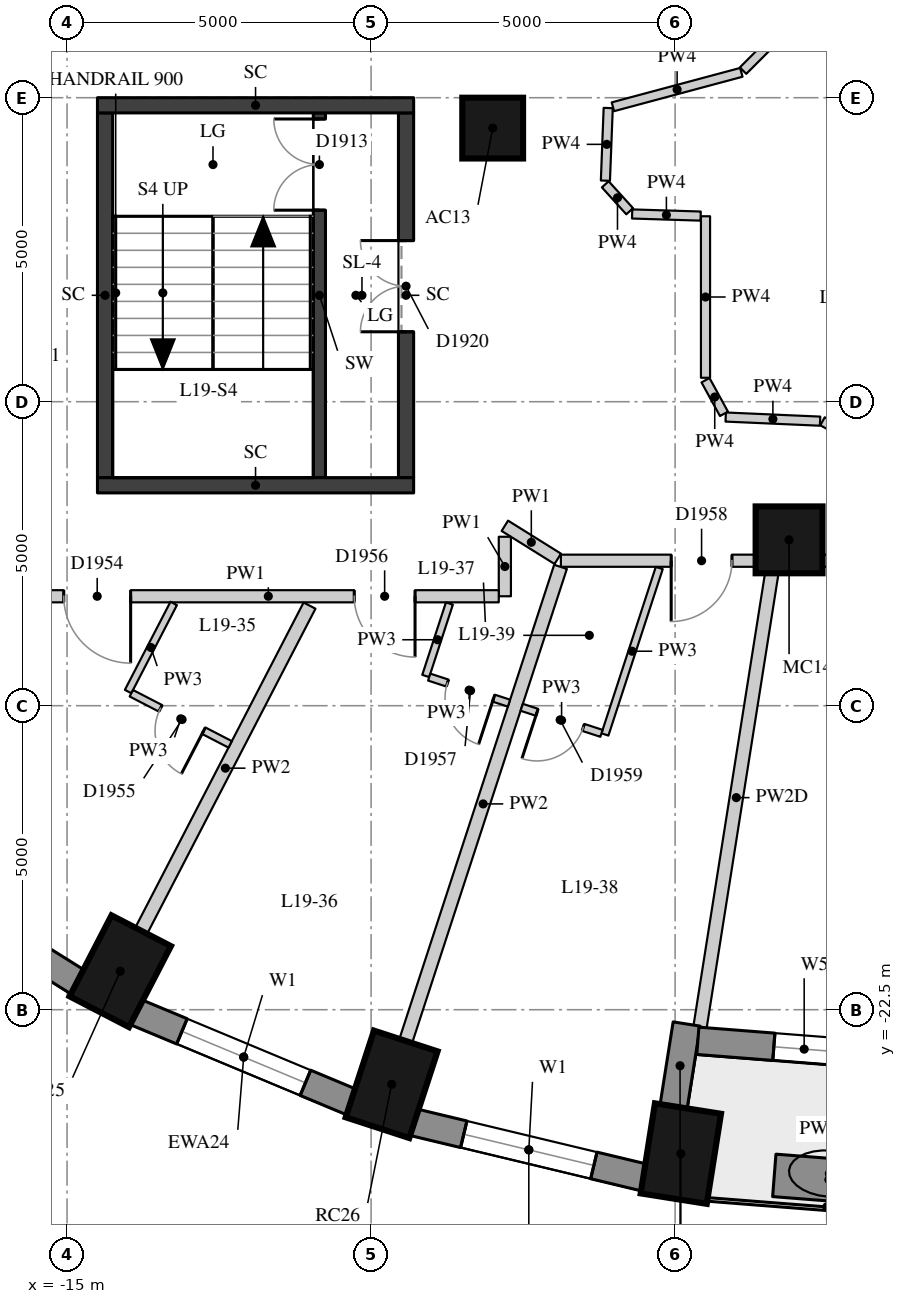
"""IFC4 building model, lengths in metres.
Left out: names, types, materials, properties, quantities, classifications, styles, units other than length and angle.
Written with IfcOpenShell. Run it as: python <this file> out.ifc"""

import sys

from ifc_helpers import new_model, si_unit, direction, frame, frame_2d, origin, origin_2d, place, context, subcontext, project, spatial, rectangle, extrude, element, fill, save


model = new_model("IFC4")
c1 = context("Model", 3, precision=1e-05, world=origin(), true_north=direction((0.0, 1.0)))
c2 = subcontext(c1, "Body", "Model", "MODEL_VIEW")
j1 = project(units=[si_unit("LENGTHUNIT", "METRE"), si_unit("PLANEANGLEUNIT", "RADIAN")], contexts=[c1])
p1 = place(None, origin())
s1 = spatial("IfcSite", under=j1, at=p1, CompositionType="ELEMENT")
p2 = place(p1, origin())
s2 = spatial("IfcBuilding", under=s1, at=p2, CompositionType="ELEMENT")
p3 = place(p2, frame((0.0, 0.0, 71.2)))
s3 = spatial("IfcBuildingStorey", under=s2, at=p3, CompositionType="ELEMENT", Elevation=71.2)
for number, where, z_axis, x_axis in (
    (1, (-14.125, -21.867, 0.0), (0.0, 0.0, 1.0), (-0.46, -0.888, 0.0)),
    (2, (-9.662, -23.727, 0.0), (0.0, 0.0, 1.0), (-0.31, -0.951, 0.0)),
    (3, (-4.906, -24.866, 0.0), (0.0, 0.0, 1.0), (-0.156, -0.988, 0.0)),
):
    element("IfcColumn", number, at=place(p3, frame(where, z_axis=z_axis, x_axis=x_axis)), inside=s3, PredefinedType="COLUMN", context=c2, shape_type="SweptSolid", body=[
        extrude(rectangle(XDim=1.5, YDim=1.1, at=origin_2d()), origin(), (0.0, 0.0, 1.0), 3.3),
    ])
p4 = place(p3, frame((-8.0, -8.0, 0.0), z_axis=(0.0, 0.0, 1.0), x_axis=(1.0, 0.0, 0.0)))
e4 = element("IfcColumn", 4, at=p4, inside=s3, PredefinedType="COLUMN", context=c2, shape_type="SweptSolid", body=[
    extrude(rectangle(XDim=1.0, YDim=1.0, at=origin_2d()), origin(), (0.0, 0.0, 1.0), 3.3),
])
p5 = place(p3, frame((-3.126, -14.772, 0.0), z_axis=(0.0, 0.0, 1.0), x_axis=(1.0, 0.0, 0.0)))
e5 = element("IfcColumn", 5, at=p5, inside=s3, PredefinedType="COLUMN", context=c2, shape_type="SweptSolid", body=[
    extrude(rectangle(XDim=1.1, YDim=1.1, at=origin_2d()), origin(), (0.0, 0.0, 1.0), 3.3),
])
p6 = place(p3, frame((-18.023, -20.044, 0.0), z_axis=(0.0, 0.0, 1.0), x_axis=(0.847635480093, -0.530579016629, 0.0)))
e6 = element("IfcWall", 6, at=p6, inside=s3, PredefinedType="SOLIDWALL", context=c2, shape_type="SweptSolid", body=[
    extrude(rectangle(XDim=3.782, YDim=0.45, at=frame_2d((1.891, 0.0))), origin(), (0.0, 0.0, 1.0), 3.02),
])
p7 = place(p6, frame((0.791, 0.0, 0.4)))
e7 = element("IfcOpeningElement", 7, at=p7, cuts=e6, PredefinedType="OPENING", context=c2, shape_type="SweptSolid", body=[
    extrude(rectangle(XDim=2.2, YDim=1.75, at=frame_2d((1.1, 0.875))), frame((0.0, 0.235, 0.0), z_axis=(0.0, -1.0, 0.0), x_axis=(1.0, 0.0, 0.0)), (0.0, 0.0, 1.0), 0.47),
])
p8 = place(p3, frame((-13.875, -22.537, 0.0), z_axis=(0.0, 0.0, 1.0), x_axis=(0.923031964282, -0.384723267966, 0.0)))
e8 = element("IfcWall", 8, at=p8, inside=s3, PredefinedType="SOLIDWALL", context=c2, shape_type="SweptSolid", body=[
    extrude(rectangle(XDim=3.856, YDim=0.45, at=frame_2d((1.928, 0.0))), origin(), (0.0, 0.0, 1.0), 3.02),
])
p9 = place(p8, frame((0.828, 0.0, 0.4)))
e9 = element("IfcOpeningElement", 9, at=p9, cuts=e8, PredefinedType="OPENING", context=c2, shape_type="SweptSolid", body=[
    extrude(rectangle(XDim=2.2, YDim=1.75, at=frame_2d((1.1, 0.875))), frame((0.0, 0.235, 0.0), z_axis=(0.0, -1.0, 0.0), x_axis=(1.0, 0.0, 0.0)), (0.0, 0.0, 1.0), 0.47),
])
p10 = place(p3, frame((-9.308, -24.35, 0.0), z_axis=(0.0, 0.0, 1.0), x_axis=(0.972496561493, -0.232917233979, 0.0)))
e10 = element("IfcWall", 10, at=p10, inside=s3, PredefinedType="SOLIDWALL", context=c2, shape_type="SweptSolid", body=[
    extrude(rectangle(XDim=3.911, YDim=0.45, at=frame_2d((1.956, 0.0))), origin(), (0.0, 0.0, 1.0), 3.02),
])
p11 = place(p10, frame((0.855, 0.0, 0.4)))
e11 = element("IfcOpeningElement", 11, at=p11, cuts=e10, PredefinedType="OPENING", context=c2, shape_type="SweptSolid", body=[
    extrude(rectangle(XDim=2.2, YDim=1.75, at=frame_2d((1.1, 0.875))), frame((0.0, 0.235, 0.0), z_axis=(0.0, -1.0, 0.0), x_axis=(1.0, 0.0, 0.0)), (0.0, 0.0, 1.0), 0.47),
])
p12 = place(p3, frame((-5.027, -24.108, 0.0), z_axis=(0.0, 0.0, 1.0), x_axis=(0.156133927791, 0.98773589415, 0.0)))
e12 = element("IfcWall", 12, at=p12, inside=s3, PredefinedType="SOLIDWALL", context=c2, shape_type="SweptSolid", body=[
    extrude(rectangle(XDim=1.39, YDim=0.45, at=frame_2d((0.695, 0.0))), origin(), (0.0, 0.0, 1.0), 2.47),
])
p13 = place(p3, frame((-4.626, -23.011, 0.0), z_axis=(0.0, 0.0, 1.0), x_axis=(0.996937095772, -0.078207589615, 0.0)))
e13 = element("IfcWall", 13, at=p13, inside=s3, PredefinedType="SOLIDWALL", context=c2, shape_type="SweptSolid", body=[
    extrude(rectangle(XDim=4.657, YDim=0.45, at=frame_2d((2.329, 0.0))), origin(), (0.0, 0.0, 1.0), 3.02),
])
p14 = place(p13, frame((1.254, 0.0, 0.4)))
e14 = element("IfcOpeningElement", 14, at=p14, cuts=e13, PredefinedType="OPENING", context=c2, shape_type="SweptSolid", body=[
    extrude(rectangle(XDim=1.0, YDim=1.75, at=frame_2d((0.5, 0.875))), frame((0.0, 0.235, 0.0), z_axis=(0.0, -1.0, 0.0), x_axis=(1.0, 0.0, 0.0)), (0.0, 0.0, 1.0), 0.47),
])
p15 = place(p13, frame((2.404, 0.0, 0.0)))
e15 = element("IfcOpeningElement", 15, at=p15, cuts=e13, PredefinedType="OPENING", context=c2, shape_type="SweptSolid", body=[
    extrude(rectangle(XDim=1.0, YDim=2.15, at=frame_2d((0.5, 1.075))), frame((0.0, 0.235, 0.0), z_axis=(0.0, -1.0, 0.0), x_axis=(1.0, 0.0, 0.0)), (0.0, 0.0, 1.0), 0.47),
])
p16 = place(p3, frame((-3.369, -25.225, 0.0), z_axis=(0.0, 0.0, 1.0), x_axis=(0.996965267018, -0.077847648384, 0.0)))
e16 = element("IfcWall", 16, at=p16, inside=s3, PredefinedType="USERDEFINED", context=c2, shape_type="SweptSolid", body=[
    extrude(rectangle(XDim=1.8, YDim=0.7, at=frame_2d((0.9, 0.0))), origin(), (0.0, 0.0, 1.0), 0.75),
])
p17 = place(p3, frame((-10.85, -13.75, 0.0), z_axis=(0.0, 0.0, 1.0), x_axis=(0.0, 1.0, 0.0)))
e17 = element("IfcWall", 17, at=p17, inside=s3, PredefinedType="SHEAR", context=c2, shape_type="SweptSolid", body=[
    extrude(rectangle(XDim=6.0, YDim=0.2, at=frame_2d((3.0, 0.0))), origin(), (0.0, 0.0, 1.0), 3.02),
])
p18 = place(p17, frame((4.4, 0.0, 0.0)))
e18 = element("IfcOpeningElement", 18, at=p18, cuts=e17, PredefinedType="OPENING", context=c2, shape_type="SweptSolid", body=[
    extrude(rectangle(XDim=1.5, YDim=2.1, at=frame_2d((0.75, 1.05))), frame((0.0, 0.11, 0.0), z_axis=(0.0, -1.0, 0.0), x_axis=(1.0, 0.0, 0.0)), (0.0, 0.0, 1.0), 0.22),
])
p19 = place(p3, frame((-14.375, -13.75, -0.28), z_axis=(0.0, 0.0, 1.0), x_axis=(0.0, 1.0, 0.0)))
e19 = element("IfcWall", 19, at=p19, inside=s3, PredefinedType="SHEAR", context=c2, shape_type="SweptSolid", body=[
    extrude(rectangle(XDim=6.0, YDim=0.25, at=frame_2d((3.0, 0.0))), origin(), (0.0, 0.0, 1.0), 3.3),
])
p20 = place(p3, frame((-9.425, -13.75, -0.28), z_axis=(0.0, 0.0, 1.0), x_axis=(0.0, 1.0, 0.0)))
e20 = element("IfcWall", 20, at=p20, inside=s3, PredefinedType="SHEAR", context=c2, shape_type="SweptSolid", body=[
    extrude(rectangle(XDim=6.0, YDim=0.25, at=frame_2d((3.0, 0.0))), origin(), (0.0, 0.0, 1.0), 3.3),
])
p21 = place(p20, frame((2.4, 0.0, 0.28)))
e21 = element("IfcOpeningElement", 21, at=p21, cuts=e20, PredefinedType="OPENING", context=c2, shape_type="SweptSolid", body=[
    extrude(rectangle(XDim=1.5, YDim=2.1, at=frame_2d((0.75, 1.05))), frame((0.0, 0.135, 0.0), z_axis=(0.0, -1.0, 0.0), x_axis=(1.0, 0.0, 0.0)), (0.0, 0.0, 1.0), 0.27),
])
for number, where, z_axis, x_axis in (
    (22, (-14.5, -7.625, -0.28), (0.0, 0.0, 1.0), (1.0, 0.0, 0.0)),
    (23, (-14.5, -13.875, -0.28), (0.0, 0.0, 1.0), (1.0, 0.0, 0.0)),
):
    element("IfcWall", number, at=place(p3, frame(where, z_axis=z_axis, x_axis=x_axis)), inside=s3, PredefinedType="SHEAR", context=c2, shape_type="SweptSolid", body=[
        extrude(rectangle(XDim=5.2, YDim=0.25, at=frame_2d((2.6, 0.0))), origin(), (0.0, 0.0, 1.0), 3.3),
    ])
p22 = place(p3, frame((6.778, -15.115, 0.0), z_axis=(0.0, 0.0, 1.0), x_axis=(-1.0, 0.0, 0.0)))
e24 = element("IfcWall", 24, at=p22, inside=s3, PredefinedType="PARTITIONING", context=c2, shape_type="SweptSolid", body=[
    extrude(rectangle(XDim=13.657, YDim=0.2, at=frame_2d((6.828, 0.0))), origin(), (0.0, 0.0, 1.0), 2.42),
])
p23 = place(p22, frame((10.843, 0.0, 0.0)))
e25 = element("IfcOpeningElement", 25, at=p23, cuts=e24, PredefinedType="OPENING", context=c2, shape_type="SweptSolid", body=[
    extrude(rectangle(XDim=1.0, YDim=2.1, at=frame_2d((0.5, 1.05))), frame((0.0, 0.11, 0.0), z_axis=(0.0, -1.0, 0.0), x_axis=(1.0, 0.0, 0.0)), (0.0, 0.0, 1.0), 0.22),
])
p24 = place(p22, frame((4.505, 0.0, 0.0)))
e26 = element("IfcOpeningElement", 26, at=p24, cuts=e24, PredefinedType="OPENING", context=c2, shape_type="SweptSolid", body=[
    extrude(rectangle(XDim=1.1, YDim=2.1, at=frame_2d((0.55, 1.05))), frame((0.0, 0.11, 0.0), z_axis=(0.0, -1.0, 0.0), x_axis=(1.0, 0.0, 0.0)), (0.0, 0.0, 1.0), 0.22),
])
p25 = place(p3, frame((-6.93, -15.084, 0.0), z_axis=(0.0, 0.0, 1.0), x_axis=(-0.848439230109, 0.529292804421, 0.0)))
e27 = element("IfcWall", 27, at=p25, inside=s3, PredefinedType="PARTITIONING", context=c2, shape_type="SweptSolid", body=[
    extrude(rectangle(XDim=1.026, YDim=0.2, at=frame_2d((0.513, 0.0))), origin(), (0.0, 0.0, 1.0), 3.02),
])
p26 = place(p3, frame((-7.8, -14.721, 0.0), z_axis=(0.0, 0.0, 1.0), x_axis=(0.0, -1.0, 0.0)))
e28 = element("IfcWall", 28, at=p26, inside=s3, PredefinedType="PARTITIONING", context=c2, shape_type="SweptSolid", body=[
    extrude(rectangle(XDim=0.979, YDim=0.2, at=frame_2d((0.489, 0.0))), origin(), (0.0, 0.0, 1.0), 3.02),
])
p27 = place(p3, frame((-7.9, -15.7, 0.0), z_axis=(0.0, 0.0, 1.0), x_axis=(-1.0, 0.0, 0.0)))
e29 = element("IfcWall", 29, at=p27, inside=s3, PredefinedType="PARTITIONING", context=c2, shape_type="SweptSolid", body=[
    extrude(rectangle(XDim=7.58, YDim=0.2, at=frame_2d((3.79, 0.0))), origin(), (0.0, 0.0, 1.0), 3.02),
])
p28 = place(p27, frame((6.054, 0.0, 0.0)))
e30 = element("IfcOpeningElement", 30, at=p28, cuts=e29, PredefinedType="OPENING", context=c2, shape_type="SweptSolid", body=[
    extrude(rectangle(XDim=1.1, YDim=2.1, at=frame_2d((0.55, 1.05))), frame((0.0, 0.11, 0.0), z_axis=(0.0, -1.0, 0.0), x_axis=(1.0, 0.0, 0.0)), (0.0, 0.0, 1.0), 0.22),
])
p29 = place(p27, frame((1.377, 0.0, 0.0)))
e31 = element("IfcOpeningElement", 31, at=p29, cuts=e29, PredefinedType="OPENING", context=c2, shape_type="SweptSolid", body=[
    extrude(rectangle(XDim=1.0, YDim=2.1, at=frame_2d((0.5, 1.05))), frame((0.0, 0.11, 0.0), z_axis=(0.0, -1.0, 0.0), x_axis=(1.0, 0.0, 0.0)), (0.0, 0.0, 1.0), 0.22),
])
p30 = place(p3, frame((-1.545, -13.396, 0.0), z_axis=(0.0, 0.0, 1.0), x_axis=(-0.873678559566, 0.486503622345, 0.0)))
e32 = element("IfcWall", 32, at=p30, inside=s3, PredefinedType="PARTITIONING", context=c2, shape_type="SweptSolid", body=[
    extrude(rectangle(XDim=1.18, YDim=0.15, at=frame_2d((0.59, 0.0))), origin(), (0.0, 0.0, 1.0), 3.02),
])
p31 = place(p3, frame((-2.616, -12.82, 0.0), z_axis=(0.0, 0.0, 1.0), x_axis=(-0.99904515517, 0.04368956318, 0.0)))
e33 = element("IfcWall", 33, at=p31, inside=s3, PredefinedType="PARTITIONING", context=c2, shape_type="SweptSolid", body=[
    extrude(rectangle(XDim=1.553, YDim=0.15, at=frame_2d((0.777, 0.0))), origin(), (0.0, 0.0, 1.0), 3.02),
])
p32 = place(p3, frame((-4.196, -12.699, 0.0), z_axis=(0.0, 0.0, 1.0), x_axis=(-0.481398734925, 0.876501715921, 0.0)))
e34 = element("IfcWall", 34, at=p32, inside=s3, PredefinedType="PARTITIONING", context=c2, shape_type="SweptSolid", body=[
    extrude(rectangle(XDim=0.631, YDim=0.15, at=frame_2d((0.315, 0.0))), origin(), (0.0, 0.0, 1.0), 3.02),
])
p33 = place(p3, frame((-4.5, -12.106, 0.0), z_axis=(0.0, 0.0, 1.0), x_axis=(0.0, 1.0, 0.0)))
e35 = element("IfcWall", 35, at=p33, inside=s3, PredefinedType="PARTITIONING", context=c2, shape_type="SweptSolid", body=[
    extrude(rectangle(XDim=2.656, YDim=0.15, at=frame_2d((1.328, 0.0))), origin(), (0.0, 0.0, 1.0), 3.02),
])
p34 = place(p3, frame((-4.58, -9.447, 0.0), z_axis=(0.0, 0.0, 1.0), x_axis=(-0.999526758156, 0.030761334993, 0.0)))
e36 = element("IfcWall", 36, at=p34, inside=s3, PredefinedType="PARTITIONING", context=c2, shape_type="SweptSolid", body=[
    extrude(rectangle(XDim=1.127, YDim=0.15, at=frame_2d((0.563, 0.0))), origin(), (0.0, 0.0, 1.0), 3.02),
])
p35 = place(p3, frame((-5.747, -9.368, 0.0), z_axis=(0.0, 0.0, 1.0), x_axis=(-0.671757620202, 0.740771017049, 0.0)))
e37 = element("IfcWall", 37, at=p35, inside=s3, PredefinedType="PARTITIONING", context=c2, shape_type="SweptSolid", body=[
    extrude(rectangle(XDim=0.598, YDim=0.15, at=frame_2d((0.299, 0.0))), origin(), (0.0, 0.0, 1.0), 3.02),
])
p36 = place(p3, frame((-6.146, -8.865, 0.0), z_axis=(0.0, 0.0, 1.0), x_axis=(0.038582079081, 0.999255434398, 0.0)))
e38 = element("IfcWall", 38, at=p36, inside=s3, PredefinedType="PARTITIONING", context=c2, shape_type="SweptSolid", body=[
    extrude(rectangle(XDim=1.196, YDim=0.15, at=frame_2d((0.598, 0.0))), origin(), (0.0, 0.0, 1.0), 3.02),
])
p37 = place(p3, frame((-6.023, -7.649, 0.0), z_axis=(0.0, 0.0, 1.0), x_axis=(0.965906186456, 0.258892330836, 0.0)))
e39 = element("IfcWall", 39, at=p37, inside=s3, PredefinedType="PARTITIONING", context=c2, shape_type="SweptSolid", body=[
    extrude(rectangle(XDim=2.187, YDim=0.15, at=frame_2d((1.093, 0.0))), origin(), (0.0, 0.0, 1.0), 3.02),
])
p38 = place(p3, frame((-3.882, -7.055, 0.0), z_axis=(0.0, 0.0, 1.0), x_axis=(0.707069126061, 0.707144434307, 0.0)))
e40 = element("IfcWall", 40, at=p38, inside=s3, PredefinedType="PARTITIONING", context=c2, shape_type="SweptSolid", body=[
    extrude(rectangle(XDim=3.242, YDim=0.15, at=frame_2d((1.621, 0.0))), origin(), (0.0, 0.0, 1.0), 3.02),
])
p39 = place(p3, frame((-13.78, -21.201, 0.0), z_axis=(0.0, 0.0, 1.0), x_axis=(0.459689820266, 0.888079539875, 0.0)))
e41 = element("IfcWall", 41, at=p39, inside=s3, PredefinedType="PARTITIONING", context=c2, shape_type="SweptSolid", body=[
    extrude(rectangle(XDim=6.021, YDim=0.22, at=frame_2d((3.011, 0.0))), origin(), (0.0, 0.0, 1.0), 3.02),
])
p40 = place(p3, frame((-9.429, -23.014, 0.0), z_axis=(0.0, 0.0, 1.0), x_axis=(0.310248090606, 0.950655627594, 0.0)))
e42 = element("IfcWall", 42, at=p40, inside=s3, PredefinedType="PARTITIONING", context=c2, shape_type="SweptSolid", body=[
    extrude(rectangle(XDim=8.203, YDim=0.22, at=frame_2d((4.102, 0.0))), origin(), (0.0, 0.0, 1.0), 3.02),
])
p41 = place(p3, frame((-4.591, -22.789, 0.0), z_axis=(0.0, 0.0, 1.0), x_axis=(0.156151107863, 0.987733178299, 0.0)))
e43 = element("IfcWall", 43, at=p41, inside=s3, PredefinedType="PARTITIONING", context=c2, shape_type="SweptSolid", body=[
    extrude(rectangle(XDim=7.647, YDim=0.22, at=frame_2d((3.823, 0.0))), origin(), (0.0, 0.0, 1.0), 2.47),
])
p42 = place(p3, frame((-13.246, -15.818, 0.0), z_axis=(0.0, 0.0, 1.0), x_axis=(-0.459675202516, -0.888087106196, 0.0)))
e44 = element("IfcWall", 44, at=p42, inside=s3, PredefinedType="PARTITIONING", context=c2, shape_type="SweptSolid", body=[
    extrude(rectangle(XDim=1.632, YDim=0.12, at=frame_2d((0.816, 0.0))), origin(), (0.0, 0.0, 1.0), 3.02),
])
p43 = place(p3, frame((-8.712, -15.819, 0.0), z_axis=(0.0, 0.0, 1.0), x_axis=(-0.310322794195, -0.950631244702, 0.0)))
e45 = element("IfcWall", 45, at=p43, inside=s3, PredefinedType="PARTITIONING", context=c2, shape_type="SweptSolid", body=[
    extrude(rectangle(XDim=1.254, YDim=0.12, at=frame_2d((0.627, 0.0))), origin(), (0.0, 0.0, 1.0), 3.02),
])
p44 = place(p3, frame((-5.26, -15.235, 0.0), z_axis=(0.0, 0.0, 1.0), x_axis=(-0.310220453498, -0.950664646567, 0.0)))
e46 = element("IfcWall", 46, at=p44, inside=s3, PredefinedType="PARTITIONING", context=c2, shape_type="SweptSolid", body=[
    extrude(rectangle(XDim=2.88, YDim=0.12, at=frame_2d((1.44, 0.0))), origin(), (0.0, 0.0, 1.0), 3.02),
])
p45 = place(p3, frame((-13.943, -17.295, 0.0), z_axis=(0.0, 0.0, 1.0), x_axis=(0.888151937069, -0.459549928387, 0.0)))
e47 = element("IfcWall", 47, at=p45, inside=s3, PredefinedType="PARTITIONING", context=c2, shape_type="SweptSolid", body=[
    extrude(rectangle(XDim=1.83, YDim=0.12, at=frame_2d((0.915, 0.0))), origin(), (0.0, 0.0, 1.0), 3.02),
])
p46 = place(p45, frame((0.54, 0.0, 0.0)))
e48 = element("IfcOpeningElement", 48, at=p46, cuts=e47, PredefinedType="OPENING", context=c2, shape_type="SweptSolid", body=[
    extrude(rectangle(XDim=0.8, YDim=2.1, at=frame_2d((0.4, 1.05))), frame((0.0, 0.07, 0.0), z_axis=(0.0, -1.0, 0.0), x_axis=(1.0, 0.0, 0.0)), (0.0, 0.0, 1.0), 0.14),
])
p47 = place(p3, frame((-9.044, -17.03, 0.0), z_axis=(0.0, 0.0, 1.0), x_axis=(0.950645927723, -0.31027781117, 0.0)))
e49 = element("IfcWall", 49, at=p47, inside=s3, PredefinedType="PARTITIONING", context=c2, shape_type="SweptSolid", body=[
    extrude(rectangle(XDim=1.38, YDim=0.12, at=frame_2d((0.69, 0.0))), origin(), (0.0, 0.0, 1.0), 3.02),
])
p48 = place(p47, frame((0.315, 0.0, 0.0)))
e50 = element("IfcOpeningElement", 50, at=p48, cuts=e49, PredefinedType="OPENING", context=c2, shape_type="SweptSolid", body=[
    extrude(rectangle(XDim=0.8, YDim=2.1, at=frame_2d((0.4, 1.05))), frame((0.0, 0.07, 0.0), z_axis=(0.0, -1.0, 0.0), x_axis=(1.0, 0.0, 0.0)), (0.0, 0.0, 1.0), 0.14),
])
p49 = place(p3, frame((-6.211, -17.955, 0.0), z_axis=(0.0, 0.0, 1.0), x_axis=(-0.950645927723, 0.31027781117, 0.0)))
e51 = element("IfcWall", 51, at=p49, inside=s3, PredefinedType="PARTITIONING", context=c2, shape_type="SweptSolid", body=[
    extrude(rectangle(XDim=1.38, YDim=0.12, at=frame_2d((0.69, 0.0))), origin(), (0.0, 0.0, 1.0), 3.02),
])
p50 = place(p49, frame((0.315, 0.0, 0.0)))
e52 = element("IfcOpeningElement", 52, at=p50, cuts=e51, PredefinedType="OPENING", context=c2, shape_type="SweptSolid", body=[
    extrude(rectangle(XDim=0.8, YDim=2.1, at=frame_2d((0.4, 1.05))), frame((0.0, 0.07, 0.0), z_axis=(0.0, -1.0, 0.0), x_axis=(1.0, 0.0, 0.0)), (0.0, 0.0, 1.0), 0.14),
])
p51 = place(p9, origin())
e53 = element("IfcWindow", 53, at=p51, inside=s3, PartitioningType="SINGLE_PANEL", PredefinedType="WINDOW", context=c2, shape_type="SweptSolid", body=[
    extrude(rectangle(XDim=2.2, YDim=1.75, at=frame_2d((1.1, 0.875))), frame((0.0, 0.035, 0.0), z_axis=(0.0, -1.0, 0.0), x_axis=(1.0, 0.0, 0.0)), (0.0, 0.0, 1.0), 0.06),
])
fill(e9, e53)
p52 = place(p11, origin())
e54 = element("IfcWindow", 54, at=p52, inside=s3, PartitioningType="SINGLE_PANEL", PredefinedType="WINDOW", context=c2, shape_type="SweptSolid", body=[
    extrude(rectangle(XDim=2.2, YDim=1.75, at=frame_2d((1.1, 0.875))), frame((0.0, 0.035, 0.0), z_axis=(0.0, -1.0, 0.0), x_axis=(1.0, 0.0, 0.0)), (0.0, 0.0, 1.0), 0.06),
])
fill(e11, e54)
p53 = place(p14, origin())
e55 = element("IfcWindow", 55, at=p53, inside=s3, PartitioningType="SINGLE_PANEL", PredefinedType="WINDOW", context=c2, shape_type="SweptSolid", body=[
    extrude(rectangle(XDim=1.0, YDim=1.75, at=frame_2d((0.5, 0.875))), frame((0.0, 0.035, 0.0), z_axis=(0.0, -1.0, 0.0), x_axis=(1.0, 0.0, 0.0)), (0.0, 0.0, 1.0), 0.06),
])
fill(e14, e55)
p54 = place(p18, origin())
e56 = element("IfcDoor", 56, at=p54, inside=s3, OperationType="DOUBLE_DOOR_SINGLE_SWING", PredefinedType="DOOR", context=c2, shape_type="SweptSolid", body=[
    extrude(rectangle(XDim=1.5, YDim=2.1, at=frame_2d((0.75, 1.05))), frame((0.0, 0.025, 0.0), z_axis=(0.0, -1.0, 0.0), x_axis=(1.0, 0.0, 0.0)), (0.0, 0.0, 1.0), 0.05),
])
fill(e18, e56)
p55 = place(p21, origin())
e57 = element("IfcDoor", 57, at=p55, inside=s3, OperationType="DOUBLE_DOOR_SINGLE_SWING", PredefinedType="DOOR", context=c2, shape_type="SweptSolid", body=[
    extrude(rectangle(XDim=1.5, YDim=2.1, at=frame_2d((0.75, 1.05))), frame((0.0, 0.025, 0.0), z_axis=(0.0, -1.0, 0.0), x_axis=(1.0, 0.0, 0.0)), (0.0, 0.0, 1.0), 0.05),
])
fill(e21, e57)
p56 = place(p28, origin())
e58 = element("IfcDoor", 58, at=p56, inside=s3, OperationType="SINGLE_SWING_LEFT", PredefinedType="DOOR", context=c2, shape_type="SweptSolid", body=[
    extrude(rectangle(XDim=1.1, YDim=2.1, at=frame_2d((0.55, 1.05))), frame((0.0, 0.025, 0.0), z_axis=(0.0, -1.0, 0.0), x_axis=(1.0, 0.0, 0.0)), (0.0, 0.0, 1.0), 0.05),
])
fill(e30, e58)
p57 = place(p46, origin())
e59 = element("IfcDoor", 59, at=p57, inside=s3, OperationType="SINGLE_SWING_LEFT", PredefinedType="DOOR", context=c2, shape_type="SweptSolid", body=[
    extrude(rectangle(XDim=0.8, YDim=2.1, at=frame_2d((0.4, 1.05))), frame((0.0, 0.025, 0.0), z_axis=(0.0, -1.0, 0.0), x_axis=(1.0, 0.0, 0.0)), (0.0, 0.0, 1.0), 0.05),
])
fill(e48, e59)
p58 = place(p29, origin())
e60 = element("IfcDoor", 60, at=p58, inside=s3, OperationType="SINGLE_SWING_LEFT", PredefinedType="DOOR", context=c2, shape_type="SweptSolid", body=[
    extrude(rectangle(XDim=1.0, YDim=2.1, at=frame_2d((0.5, 1.05))), frame((0.0, 0.025, 0.0), z_axis=(0.0, -1.0, 0.0), x_axis=(1.0, 0.0, 0.0)), (0.0, 0.0, 1.0), 0.05),
])
fill(e31, e60)
p59 = place(p48, origin())
e61 = element("IfcDoor", 61, at=p59, inside=s3, OperationType="SINGLE_SWING_LEFT", PredefinedType="DOOR", context=c2, shape_type="SweptSolid", body=[
    extrude(rectangle(XDim=0.8, YDim=2.1, at=frame_2d((0.4, 1.05))), frame((0.0, 0.025, 0.0), z_axis=(0.0, -1.0, 0.0), x_axis=(1.0, 0.0, 0.0)), (0.0, 0.0, 1.0), 0.05),
])
fill(e50, e61)
p60 = place(p23, origin())
e62 = element("IfcDoor", 62, at=p60, inside=s3, OperationType="SINGLE_SWING_RIGHT", PredefinedType="DOOR", context=c2, shape_type="SweptSolid", body=[
    extrude(rectangle(XDim=1.0, YDim=2.1, at=frame_2d((0.5, 1.05))), frame((0.0, 0.025, 0.0), z_axis=(0.0, -1.0, 0.0), x_axis=(1.0, 0.0, 0.0)), (0.0, 0.0, 1.0), 0.05),
])
fill(e25, e62)
p61 = place(p50, origin())
e63 = element("IfcDoor", 63, at=p61, inside=s3, OperationType="SINGLE_SWING_RIGHT", PredefinedType="DOOR", context=c2, shape_type="SweptSolid", body=[
    extrude(rectangle(XDim=0.8, YDim=2.1, at=frame_2d((0.4, 1.05))), frame((0.0, 0.025, 0.0), z_axis=(0.0, -1.0, 0.0), x_axis=(1.0, 0.0, 0.0)), (0.0, 0.0, 1.0), 0.05),
])
fill(e52, e63)
save(model, sys.argv[1])
